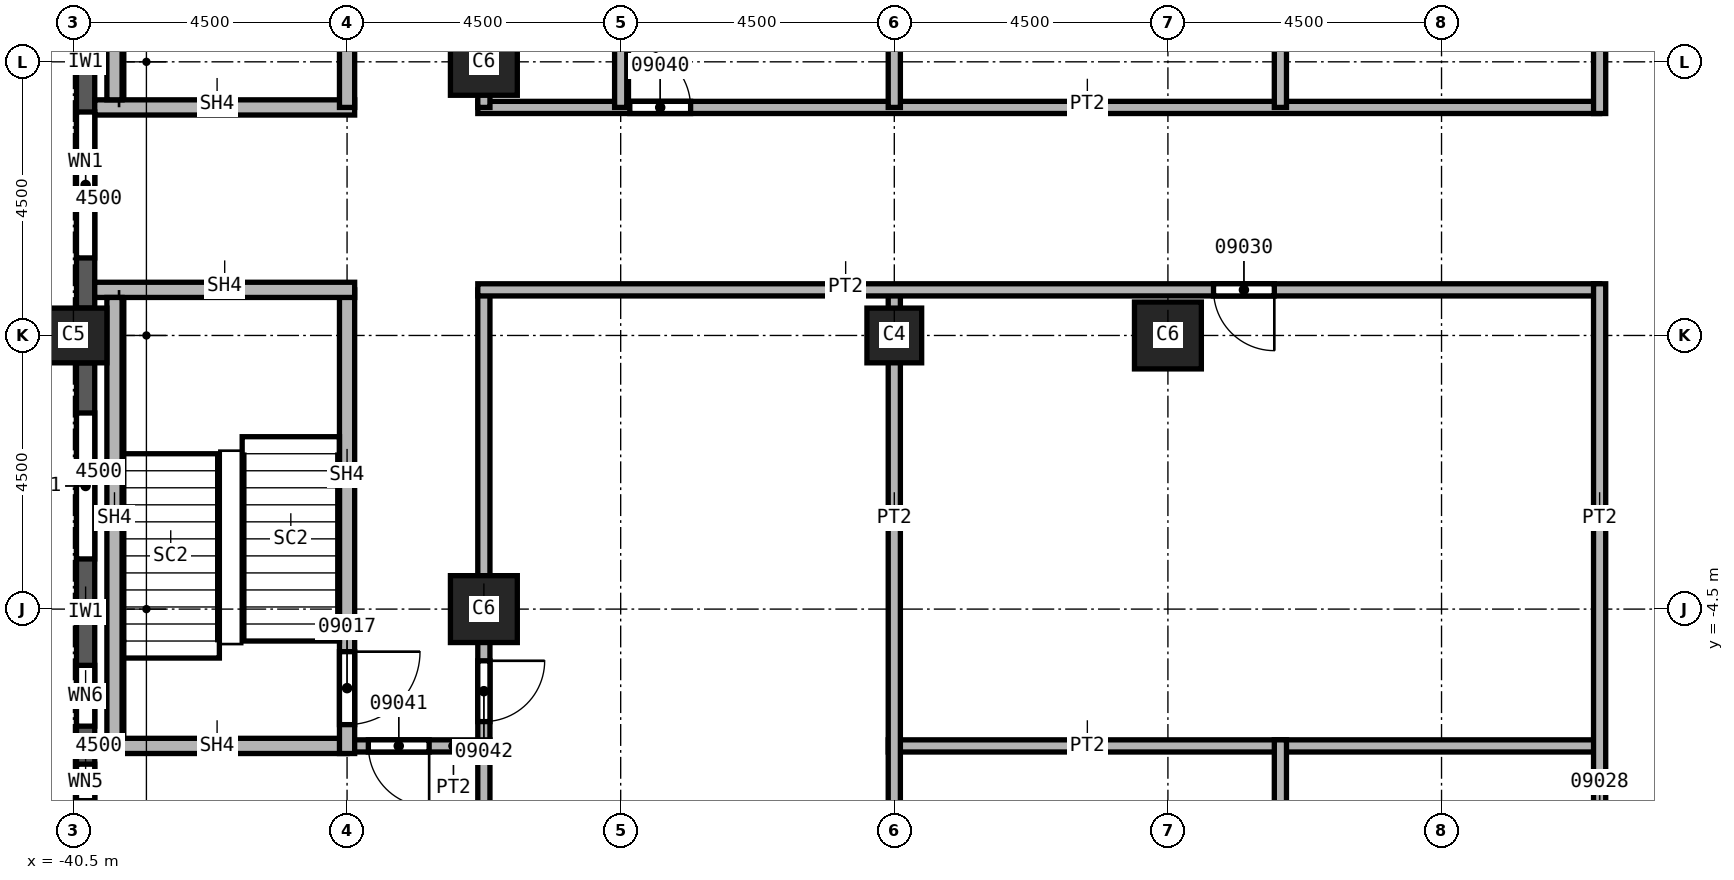
"""IFC4 building model, lengths in metres.
Left out: names, types, materials, properties, quantities, classifications, styles, units other than length and angle.
Written with IfcOpenShell. Run it as: python <this file> out.ifc"""

import sys

from ifc_helpers import new_model, si_unit, direction, frame, frame_2d, origin, origin_2d, place, context, subcontext, project, spatial, rectangle, extrude, element, fill, save


model = new_model("IFC4")
c1 = context("Model", 3, precision=1e-05, world=origin(), true_north=direction((0.0, 1.0)))
c2 = subcontext(c1, "Body", "Model", "MODEL_VIEW")
j1 = project(units=[si_unit("LENGTHUNIT", "METRE"), si_unit("PLANEANGLEUNIT", "RADIAN")], contexts=[c1])
p1 = place(None, origin())
s1 = spatial("IfcSite", under=j1, at=p1, CompositionType="ELEMENT")
p2 = place(p1, origin())
s2 = spatial("IfcBuilding", under=s1, at=p2, CompositionType="ELEMENT")
p3 = place(p2, frame((0.0, 0.0, 166.0)))
s3 = spatial("IfcBuildingStorey", under=s2, at=p3, CompositionType="ELEMENT", Elevation=166.0)
p4 = place(p3, frame((-40.5, 0.0, 0.0), z_axis=(0.0, 0.0, 1.0), x_axis=(0.0, 1.0, 0.0)))
e1 = element("IfcColumn", 1, at=p4, inside=s3, PredefinedType="COLUMN", context=c2, shape_type="SweptSolid", body=[
    extrude(rectangle(XDim=0.9, YDim=1.1, at=origin_2d()), origin(), (0.0, 0.0, 1.0), 3.7),
])
for number, where, z_axis, x_axis in (
    (2, (-33.75, 4.5, 0.0), (0.0, 0.0, 1.0), (1.0, 0.0, 0.0)),
    (3, (-33.75, -4.5, 0.0), (0.0, 0.0, 1.0), (1.0, 0.0, 0.0)),
    (4, (-22.5, 0.0, 0.0), (0.0, 0.0, 1.0), (1.0, 0.0, 0.0)),
):
    element("IfcColumn", number, at=place(p3, frame(where, z_axis=z_axis, x_axis=x_axis)), inside=s3, PredefinedType="COLUMN", context=c2, shape_type="SweptSolid", body=[
        extrude(rectangle(XDim=1.1, YDim=1.1, at=origin_2d()), origin(), (0.0, 0.0, 1.0), 3.7),
    ])
p5 = place(p3, frame((-27.0, 0.0, 0.0), z_axis=(0.0, 0.0, 1.0), x_axis=(1.0, 0.0, 0.0)))
e5 = element("IfcColumn", 5, at=p5, inside=s3, PredefinedType="COLUMN", context=c2, shape_type="SweptSolid", body=[
    extrude(rectangle(XDim=0.9, YDim=0.9, at=origin_2d()), origin(), (0.0, 0.0, 1.0), 3.7),
])
p6 = place(p3, frame((-40.3, 8.55, 0.0), z_axis=(0.0, 0.0, 1.0), x_axis=(0.0, -1.0, 0.0)))
e6 = element("IfcWall", 6, at=p6, inside=s3, PredefinedType="SOLIDWALL", context=c2, shape_type="SweptSolid", body=[
    extrude(rectangle(XDim=8.1, YDim=0.3, at=frame_2d((4.05, 0.0))), origin(), (0.0, 0.0, 1.0), 3.1),
])
p7 = place(p6, frame((0.825, 0.0, 0.8)))
e7 = element("IfcOpeningElement", 7, at=p7, cuts=e6, PredefinedType="OPENING", context=c2, shape_type="SweptSolid", body=[
    extrude(rectangle(XDim=2.4, YDim=1.95, at=frame_2d((1.2, 0.975))), frame((0.0, 0.15, 0.0), z_axis=(0.0, -1.0, 0.0), x_axis=(1.0, 0.0, 0.0)), (0.0, 0.0, 1.0), 0.3),
])
p8 = place(p6, frame((4.875, 0.0, 0.8)))
e8 = element("IfcOpeningElement", 8, at=p8, cuts=e6, PredefinedType="OPENING", context=c2, shape_type="SweptSolid", body=[
    extrude(rectangle(XDim=2.4, YDim=1.95, at=frame_2d((1.2, 0.975))), frame((0.0, 0.15, 0.0), z_axis=(0.0, -1.0, 0.0), x_axis=(1.0, 0.0, 0.0)), (0.0, 0.0, 1.0), 0.3),
])
p9 = place(p3, frame((-40.3, -0.45, 0.0), z_axis=(0.0, 0.0, 1.0), x_axis=(0.0, -1.0, 0.0)))
e9 = element("IfcWall", 9, at=p9, inside=s3, PredefinedType="SOLIDWALL", context=c2, shape_type="SweptSolid", body=[
    extrude(rectangle(XDim=8.1, YDim=0.3, at=frame_2d((4.05, 0.0))), origin(), (0.0, 0.0, 1.0), 3.1),
])
p10 = place(p9, frame((0.825, 0.0, 0.8)))
e10 = element("IfcOpeningElement", 10, at=p10, cuts=e9, PredefinedType="OPENING", context=c2, shape_type="SweptSolid", body=[
    extrude(rectangle(XDim=2.4, YDim=1.95, at=frame_2d((1.2, 0.975))), frame((0.0, 0.15, 0.0), z_axis=(0.0, -1.0, 0.0), x_axis=(1.0, 0.0, 0.0)), (0.0, 0.0, 1.0), 0.3),
])
p11 = place(p9, frame((4.975, 0.0, 0.8)))
e11 = element("IfcOpeningElement", 11, at=p11, cuts=e9, PredefinedType="OPENING", context=c2, shape_type="SweptSolid", body=[
    extrude(rectangle(XDim=1.0, YDim=1.95, at=frame_2d((0.5, 0.975))), frame((0.0, 0.15, 0.0), z_axis=(0.0, -1.0, 0.0), x_axis=(1.0, 0.0, 0.0)), (0.0, 0.0, 1.0), 0.3),
])
p12 = place(p9, frame((6.6, 0.0, 0.8)))
e12 = element("IfcOpeningElement", 12, at=p12, cuts=e9, PredefinedType="OPENING", context=c2, shape_type="SweptSolid", body=[
    extrude(rectangle(XDim=0.6, YDim=1.95, at=frame_2d((0.3, 0.975))), frame((0.0, 0.15, 0.0), z_axis=(0.0, -1.0, 0.0), x_axis=(1.0, 0.0, 0.0)), (0.0, 0.0, 1.0), 0.3),
])
p13 = place(p3, frame((-33.85, 3.75, 0.0), z_axis=(0.0, 0.0, 1.0), x_axis=(1.0, 0.0, 0.0)))
e13 = element("IfcWall", 13, at=p13, inside=s3, PredefinedType="PARTITIONING", context=c2, shape_type="SweptSolid", body=[
    extrude(rectangle(XDim=18.45, YDim=0.2, at=frame_2d((9.225, 0.0))), origin(), (0.0, 0.0, 1.0), 3.7),
])
p14 = place(p13, frame((2.5, 0.0, 0.0)))
e14 = element("IfcOpeningElement", 14, at=p14, cuts=e13, PredefinedType="OPENING", context=c2, shape_type="SweptSolid", body=[
    extrude(rectangle(XDim=1.0, YDim=2.1, at=frame_2d((0.5, 1.05))), frame((0.0, 0.1, 0.0), z_axis=(0.0, -1.0, 0.0), x_axis=(1.0, 0.0, 0.0)), (0.0, 0.0, 1.0), 0.2),
])
p15 = place(p3, frame((-33.75, 0.75, 0.0), z_axis=(0.0, 0.0, 1.0), x_axis=(0.0, -1.0, 0.0)))
e15 = element("IfcWall", 15, at=p15, inside=s3, PredefinedType="PARTITIONING", context=c2, shape_type="SweptSolid", body=[
    extrude(rectangle(XDim=18.4, YDim=0.2, at=frame_2d((9.2, 0.0))), origin(), (0.0, 0.0, 1.0), 3.7),
])
p16 = place(p15, frame((6.1, 0.0, 0.0)))
e16 = element("IfcOpeningElement", 16, at=p16, cuts=e15, PredefinedType="OPENING", context=c2, shape_type="SweptSolid", body=[
    extrude(rectangle(XDim=1.0, YDim=2.1, at=frame_2d((0.5, 1.05))), frame((0.0, 0.1, 0.0), z_axis=(0.0, -1.0, 0.0), x_axis=(1.0, 0.0, 0.0)), (0.0, 0.0, 1.0), 0.2),
])
p17 = place(p3, frame((-33.75, 11.25, 0.0), z_axis=(0.0, 0.0, 1.0), x_axis=(0.0, -1.0, 0.0)))
e17 = element("IfcWall", 17, at=p17, inside=s3, PredefinedType="PARTITIONING", context=c2, shape_type="SweptSolid", body=[
    extrude(rectangle(XDim=7.5, YDim=0.2, at=frame_2d((3.75, 0.0))), origin(), (0.0, 0.0, 1.0), 3.7),
])
p18 = place(p17, frame((1.45, 0.0, 0.0)))
e18 = element("IfcOpeningElement", 18, at=p18, cuts=e17, PredefinedType="OPENING", context=c2, shape_type="SweptSolid", body=[
    extrude(rectangle(XDim=1.0, YDim=2.1, at=frame_2d((0.5, 1.05))), frame((0.0, 0.1, 0.0), z_axis=(0.0, -1.0, 0.0), x_axis=(1.0, 0.0, 0.0)), (0.0, 0.0, 1.0), 0.2),
])
p19 = place(p3, frame((-33.65, -6.75, 0.0), z_axis=(0.0, 0.0, 1.0), x_axis=(-1.0, 0.0, 0.0)))
e19 = element("IfcWall", 19, at=p19, inside=s3, PredefinedType="PARTITIONING", context=c2, shape_type="SweptSolid", body=[
    extrude(rectangle(XDim=2.35, YDim=0.2, at=frame_2d((1.175, 0.0))), origin(), (0.0, 0.0, 1.0), 3.7),
])
p20 = place(p19, frame((1.0, 0.0, 0.0)))
e20 = element("IfcOpeningElement", 20, at=p20, cuts=e19, PredefinedType="OPENING", context=c2, shape_type="SweptSolid", body=[
    extrude(rectangle(XDim=1.0, YDim=2.1, at=frame_2d((0.5, 1.05))), frame((0.0, 0.1, 0.0), z_axis=(0.0, -1.0, 0.0), x_axis=(1.0, 0.0, 0.0)), (0.0, 0.0, 1.0), 0.2),
])
p21 = place(p3, frame((-31.5, 17.45, 0.0), z_axis=(0.0, 0.0, 1.0), x_axis=(0.0, -1.0, 0.0)))
e21 = element("IfcWall", 21, at=p21, inside=s3, PredefinedType="PARTITIONING", context=c2, shape_type="SweptSolid", body=[
    extrude(rectangle(XDim=13.7, YDim=0.2, at=frame_2d((6.85, 0.0))), origin(), (0.0, 0.0, 1.0), 3.7),
])
p22 = place(p3, frame((-27.1, -6.75, 0.0), z_axis=(0.0, 0.0, 1.0), x_axis=(1.0, 0.0, 0.0)))
e22 = element("IfcWall", 22, at=p22, inside=s3, PredefinedType="PARTITIONING", context=c2, shape_type="SweptSolid", body=[
    extrude(rectangle(XDim=11.7, YDim=0.2, at=frame_2d((5.85, 0.0))), origin(), (0.0, 0.0, 1.0), 3.7),
])
p23 = place(p3, frame((-27.0, -17.45, 0.0), z_axis=(0.0, 0.0, 1.0), x_axis=(0.0, 1.0, 0.0)))
e23 = element("IfcWall", 23, at=p23, inside=s3, PredefinedType="PARTITIONING", context=c2, shape_type="SweptSolid", body=[
    extrude(rectangle(XDim=18.2, YDim=0.2, at=frame_2d((9.1, 0.0))), origin(), (0.0, 0.0, 1.0), 3.7),
])
p24 = place(p3, frame((-27.0, 3.75, 0.0), z_axis=(0.0, 0.0, 1.0), x_axis=(0.0, 1.0, 0.0)))
e24 = element("IfcWall", 24, at=p24, inside=s3, PredefinedType="PARTITIONING", context=c2, shape_type="SweptSolid", body=[
    extrude(rectangle(XDim=13.7, YDim=0.2, at=frame_2d((6.85, 0.0))), origin(), (0.0, 0.0, 1.0), 3.7),
])
p25 = place(p3, frame((-15.4, 0.75, 0.0), z_axis=(0.0, 0.0, 1.0), x_axis=(-1.0, 0.0, 0.0)))
e25 = element("IfcWall", 25, at=p25, inside=s3, PredefinedType="PARTITIONING", context=c2, shape_type="SweptSolid", body=[
    extrude(rectangle(XDim=18.45, YDim=0.2, at=frame_2d((9.225, 0.0))), origin(), (0.0, 0.0, 1.0), 3.7),
])
p26 = place(p25, frame((5.35, 0.0, 0.0)))
e26 = element("IfcOpeningElement", 26, at=p26, cuts=e25, PredefinedType="OPENING", context=c2, shape_type="SweptSolid", body=[
    extrude(rectangle(XDim=1.0, YDim=2.1, at=frame_2d((0.5, 1.05))), frame((0.0, 0.1, 0.0), z_axis=(0.0, -1.0, 0.0), x_axis=(1.0, 0.0, 0.0)), (0.0, 0.0, 1.0), 0.2),
])
p27 = place(p3, frame((-20.65, -13.5, 0.0), z_axis=(0.0, 0.0, 1.0), x_axis=(0.0, 1.0, 0.0)))
e27 = element("IfcWall", 27, at=p27, inside=s3, PredefinedType="PARTITIONING", context=c2, shape_type="SweptSolid", body=[
    extrude(rectangle(XDim=6.85, YDim=0.2, at=frame_2d((3.425, 0.0))), origin(), (0.0, 0.0, 1.0), 3.7),
])
p28 = place(p27, frame((2.65, 0.0, 0.0)))
e28 = element("IfcOpeningElement", 28, at=p28, cuts=e27, PredefinedType="OPENING", context=c2, shape_type="SweptSolid", body=[
    extrude(rectangle(XDim=1.0, YDim=2.1, at=frame_2d((0.5, 1.05))), frame((0.0, 0.1, 0.0), z_axis=(0.0, -1.0, 0.0), x_axis=(1.0, 0.0, 0.0)), (0.0, 0.0, 1.0), 0.2),
])
p29 = place(p3, frame((-20.65, 3.75, 0.0), z_axis=(0.0, 0.0, 1.0), x_axis=(0.0, 1.0, 0.0)))
e29 = element("IfcWall", 29, at=p29, inside=s3, PredefinedType="PARTITIONING", context=c2, shape_type="SweptSolid", body=[
    extrude(rectangle(XDim=9.75, YDim=0.2, at=frame_2d((4.875, 0.0))), origin(), (0.0, 0.0, 1.0), 3.7),
])
p30 = place(p29, frame((2.65, 0.0, 0.0)))
e30 = element("IfcOpeningElement", 30, at=p30, cuts=e29, PredefinedType="OPENING", context=c2, shape_type="SweptSolid", body=[
    extrude(rectangle(XDim=1.0, YDim=2.1, at=frame_2d((0.5, 1.05))), frame((0.0, 0.1, 0.0), z_axis=(0.0, -1.0, 0.0), x_axis=(1.0, 0.0, 0.0)), (0.0, 0.0, 1.0), 0.2),
])
p31 = place(p3, frame((-15.4, -23.25, 0.0), z_axis=(0.0, 0.0, 1.0), x_axis=(0.0, 1.0, 0.0)))
e31 = element("IfcWall", 31, at=p31, inside=s3, PredefinedType="PARTITIONING", context=c2, shape_type="SweptSolid", body=[
    extrude(rectangle(XDim=24.1, YDim=0.2, at=frame_2d((12.05, 0.0))), origin(), (0.0, 0.0, 1.0), 3.7),
])
p32 = place(p31, frame((0.25, 0.0, 0.0)))
e32 = element("IfcOpeningElement", 32, at=p32, cuts=e31, PredefinedType="OPENING", context=c2, shape_type="SweptSolid", body=[
    extrude(rectangle(XDim=1.0, YDim=2.1, at=frame_2d((0.5, 1.05))), frame((0.0, 0.1, 0.0), z_axis=(0.0, -1.0, 0.0), x_axis=(1.0, 0.0, 0.0)), (0.0, 0.0, 1.0), 0.2),
])
p33 = place(p31, frame((8.55, 0.0, 0.0)))
e33 = element("IfcOpeningElement", 33, at=p33, cuts=e31, PredefinedType="OPENING", context=c2, shape_type="SweptSolid", body=[
    extrude(rectangle(XDim=1.0, YDim=2.1, at=frame_2d((0.5, 1.05))), frame((0.0, 0.1, 0.0), z_axis=(0.0, -1.0, 0.0), x_axis=(1.0, 0.0, 0.0)), (0.0, 0.0, 1.0), 0.2),
])
p34 = place(p31, frame((14.4, 0.0, 0.0)))
e34 = element("IfcOpeningElement", 34, at=p34, cuts=e31, PredefinedType="OPENING", context=c2, shape_type="SweptSolid", body=[
    extrude(rectangle(XDim=1.0, YDim=2.1, at=frame_2d((0.5, 1.05))), frame((0.0, 0.1, 0.0), z_axis=(0.0, -1.0, 0.0), x_axis=(1.0, 0.0, 0.0)), (0.0, 0.0, 1.0), 0.2),
])
p35 = place(p3, frame((-15.4, 3.65, 0.0), z_axis=(0.0, 0.0, 1.0), x_axis=(0.0, 1.0, 0.0)))
e35 = element("IfcWall", 35, at=p35, inside=s3, PredefinedType="PARTITIONING", context=c2, shape_type="SweptSolid", body=[
    extrude(rectangle(XDim=9.95, YDim=0.2, at=frame_2d((4.975, 0.0))), origin(), (0.0, 0.0, 1.0), 3.7),
])
p36 = place(p35, frame((3.55, 0.0, 0.0)))
e36 = element("IfcOpeningElement", 36, at=p36, cuts=e35, PredefinedType="OPENING", context=c2, shape_type="SweptSolid", body=[
    extrude(rectangle(XDim=1.0, YDim=2.1, at=frame_2d((0.5, 1.05))), frame((0.0, 0.1, 0.0), z_axis=(0.0, -1.0, 0.0), x_axis=(1.0, 0.0, 0.0)), (0.0, 0.0, 1.0), 0.2),
])
p37 = place(p3, frame((-40.15, 3.75, 0.0), z_axis=(0.0, 0.0, 1.0), x_axis=(1.0, 0.0, 0.0)))
e37 = element("IfcWall", 37, at=p37, inside=s3, PredefinedType="SOLIDWALL", context=c2, shape_type="SweptSolid", body=[
    extrude(rectangle(XDim=4.275, YDim=0.25, at=frame_2d((2.137, 0.0))), origin(), (0.0, 0.0, 1.0), 3.7),
])
p38 = place(p3, frame((-36.0, -6.75, 0.0), z_axis=(0.0, 0.0, 1.0), x_axis=(-1.0, 0.0, 0.0)))
e38 = element("IfcWall", 38, at=p38, inside=s3, PredefinedType="SOLIDWALL", context=c2, shape_type="SweptSolid", body=[
    extrude(rectangle(XDim=4.15, YDim=0.25, at=frame_2d((2.075, 0.0))), origin(), (0.0, 0.0, 1.0), 3.7),
])
p39 = place(p3, frame((-36.0, 0.75, 0.0), z_axis=(0.0, 0.0, 1.0), x_axis=(0.0, -1.0, 0.0)))
e39 = element("IfcWall", 39, at=p39, inside=s3, PredefinedType="SOLIDWALL", context=c2, shape_type="SweptSolid", body=[
    extrude(rectangle(XDim=7.625, YDim=0.25, at=frame_2d((3.812, 0.0))), origin(), (0.0, 0.0, 1.0), 3.7),
])
p40 = place(p39, frame((5.95, 0.0, 0.0)))
e40 = element("IfcOpeningElement", 40, at=p40, cuts=e39, PredefinedType="OPENING", context=c2, shape_type="SweptSolid", body=[
    extrude(rectangle(XDim=1.2, YDim=2.1, at=frame_2d((0.6, 1.05))), frame((0.0, 0.125, 0.0), z_axis=(0.0, -1.0, 0.0), x_axis=(1.0, 0.0, 0.0)), (0.0, 0.0, 1.0), 0.25),
])
p41 = place(p3, frame((-36.0, 11.375, 0.0), z_axis=(0.0, 0.0, 1.0), x_axis=(0.0, -1.0, 0.0)))
e41 = element("IfcWall", 41, at=p41, inside=s3, PredefinedType="SOLIDWALL", context=c2, shape_type="SweptSolid", body=[
    extrude(rectangle(XDim=7.625, YDim=0.25, at=frame_2d((3.812, 0.0))), origin(), (0.0, 0.0, 1.0), 3.7),
])
p42 = place(p41, frame((0.4, 0.0, 0.0)))
e42 = element("IfcOpeningElement", 42, at=p42, cuts=e41, PredefinedType="OPENING", context=c2, shape_type="SweptSolid", body=[
    extrude(rectangle(XDim=1.2, YDim=2.1, at=frame_2d((0.6, 1.05))), frame((0.0, 0.125, 0.0), z_axis=(0.0, -1.0, 0.0), x_axis=(1.0, 0.0, 0.0)), (0.0, 0.0, 1.0), 0.25),
])
p43 = place(p3, frame((-35.875, 0.75, 0.0), z_axis=(0.0, 0.0, 1.0), x_axis=(-1.0, 0.0, 0.0)))
e43 = element("IfcWall", 43, at=p43, inside=s3, PredefinedType="SOLIDWALL", context=c2, shape_type="SweptSolid", body=[
    extrude(rectangle(XDim=4.275, YDim=0.25, at=frame_2d((2.137, 0.0))), origin(), (0.0, 0.0, 1.0), 3.7),
])
for number, where, z_axis, x_axis in (
    (44, (-39.825, 3.875, 0.0), (0.0, 0.0, 1.0), (0.0, 1.0, 0.0)),
    (45, (-39.825, -6.625, 0.0), (0.0, 0.0, 1.0), (0.0, 1.0, 0.0)),
):
    element("IfcWall", number, at=place(p3, frame(where, z_axis=z_axis, x_axis=x_axis)), inside=s3, PredefinedType="SOLIDWALL", context=c2, shape_type="SweptSolid", body=[
        extrude(rectangle(XDim=7.25, YDim=0.25, at=frame_2d((3.625, 0.0))), origin(), (0.0, 0.0, 1.0), 3.7),
    ])
p44 = place(p8, origin())
e46 = element("IfcWindow", 46, at=p44, inside=s3, PartitioningType="SINGLE_PANEL", PredefinedType="WINDOW", context=c2, shape_type="SweptSolid", body=[
    extrude(rectangle(XDim=2.4, YDim=1.95, at=frame_2d((1.2, 0.975))), frame((0.0, 0.03, 0.0), z_axis=(0.0, -1.0, 0.0), x_axis=(1.0, 0.0, 0.0)), (0.0, 0.0, 1.0), 0.06),
])
fill(e8, e46)
p45 = place(p10, origin())
e47 = element("IfcWindow", 47, at=p45, inside=s3, PartitioningType="SINGLE_PANEL", PredefinedType="WINDOW", context=c2, shape_type="SweptSolid", body=[
    extrude(rectangle(XDim=2.4, YDim=1.95, at=frame_2d((1.2, 0.975))), frame((0.0, 0.03, 0.0), z_axis=(0.0, -1.0, 0.0), x_axis=(1.0, 0.0, 0.0)), (0.0, 0.0, 1.0), 0.06),
])
fill(e10, e47)
p46 = place(p40, origin())
e48 = element("IfcDoor", 48, at=p46, inside=s3, OperationType="SINGLE_SWING_RIGHT", PredefinedType="DOOR", context=c2, shape_type="SweptSolid", body=[
    extrude(rectangle(XDim=1.2, YDim=2.1, at=frame_2d((0.6, 1.05))), frame((0.0, 0.025, 0.0), z_axis=(0.0, -1.0, 0.0), x_axis=(1.0, 0.0, 0.0)), (0.0, 0.0, 1.0), 0.05),
])
fill(e40, e48)
p47 = place(p26, origin())
e49 = element("IfcDoor", 49, at=p47, inside=s3, OperationType="SINGLE_SWING_LEFT", PredefinedType="DOOR", context=c2, shape_type="SweptSolid", body=[
    extrude(rectangle(XDim=1.0, YDim=2.1, at=frame_2d((0.5, 1.05))), frame((0.0, 0.025, 0.0), z_axis=(0.0, -1.0, 0.0), x_axis=(1.0, 0.0, 0.0)), (0.0, 0.0, 1.0), 0.05),
])
fill(e26, e49)
p48 = place(p14, origin())
e50 = element("IfcDoor", 50, at=p48, inside=s3, OperationType="SINGLE_SWING_LEFT", PredefinedType="DOOR", context=c2, shape_type="SweptSolid", body=[
    extrude(rectangle(XDim=1.0, YDim=2.1, at=frame_2d((0.5, 1.05))), frame((0.0, 0.025, 0.0), z_axis=(0.0, -1.0, 0.0), x_axis=(1.0, 0.0, 0.0)), (0.0, 0.0, 1.0), 0.05),
])
fill(e14, e50)
p49 = place(p20, origin())
e51 = element("IfcDoor", 51, at=p49, inside=s3, OperationType="SINGLE_SWING_RIGHT", PredefinedType="DOOR", context=c2, shape_type="SweptSolid", body=[
    extrude(rectangle(XDim=1.0, YDim=2.1, at=frame_2d((0.5, 1.05))), frame((0.0, 0.025, 0.0), z_axis=(0.0, -1.0, 0.0), x_axis=(1.0, 0.0, 0.0)), (0.0, 0.0, 1.0), 0.05),
])
fill(e20, e51)
p50 = place(p16, origin())
e52 = element("IfcDoor", 52, at=p50, inside=s3, OperationType="SINGLE_SWING_LEFT", PredefinedType="DOOR", context=c2, shape_type="SweptSolid", body=[
    extrude(rectangle(XDim=1.0, YDim=2.1, at=frame_2d((0.5, 1.05))), frame((0.0, 0.025, 0.0), z_axis=(0.0, -1.0, 0.0), x_axis=(1.0, 0.0, 0.0)), (0.0, 0.0, 1.0), 0.05),
])
fill(e16, e52)
p51 = place(p11, origin())
e53 = element("IfcWindow", 53, at=p51, inside=s3, PartitioningType="SINGLE_PANEL", PredefinedType="WINDOW", context=c2, shape_type="SweptSolid", body=[
    extrude(rectangle(XDim=1.0, YDim=1.95, at=frame_2d((0.5, 0.975))), frame((0.0, 0.03, 0.0), z_axis=(0.0, -1.0, 0.0), x_axis=(1.0, 0.0, 0.0)), (0.0, 0.0, 1.0), 0.06),
])
fill(e11, e53)
p52 = place(p12, origin())
e54 = element("IfcWindow", 54, at=p52, inside=s3, PartitioningType="SINGLE_PANEL", PredefinedType="WINDOW", context=c2, shape_type="SweptSolid", body=[
    extrude(rectangle(XDim=0.6, YDim=1.95, at=frame_2d((0.3, 0.975))), frame((0.0, 0.03, 0.0), z_axis=(0.0, -1.0, 0.0), x_axis=(1.0, 0.0, 0.0)), (0.0, 0.0, 1.0), 0.06),
])
fill(e12, e54)
save(model, sys.argv[1])
